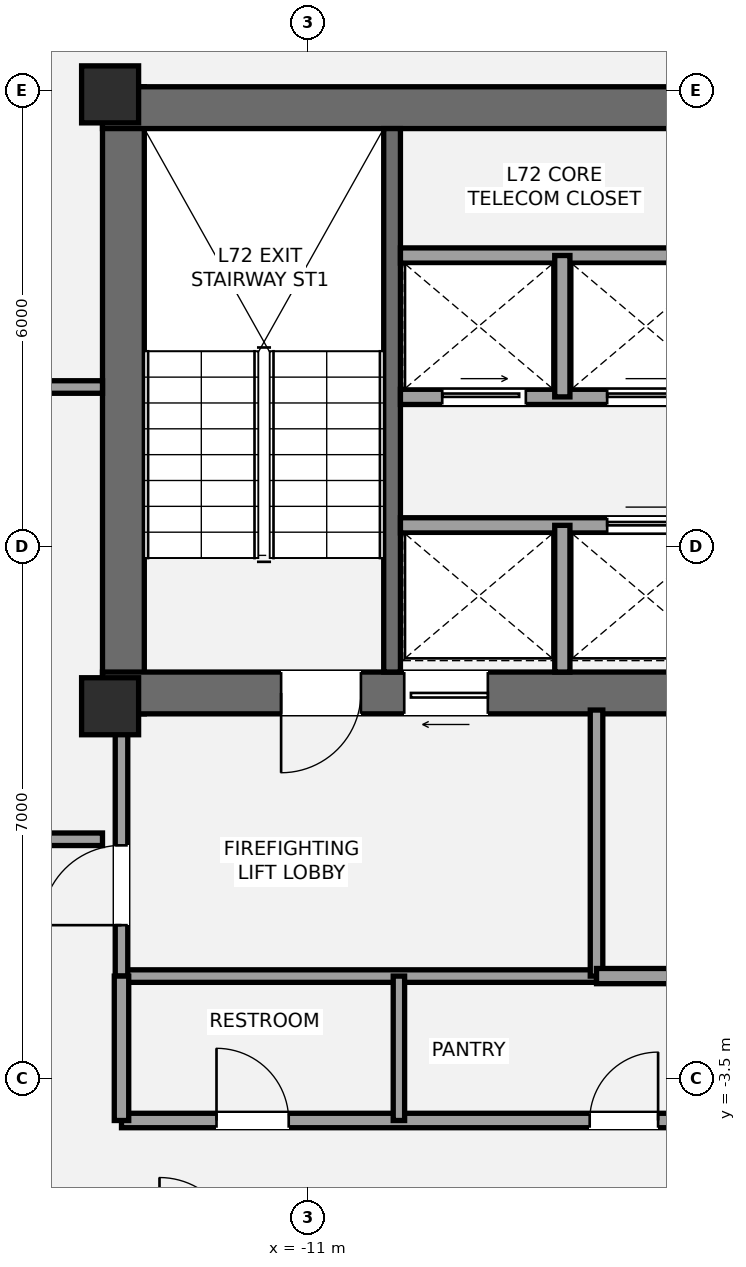
"""IFC4 building model, lengths in metres.
Left out: names, types, materials, properties, quantities, classifications, styles, units other than length and angle.
Written with IfcOpenShell. Run it as: python <this file> out.ifc"""

import sys

from ifc_helpers import new_model, si_unit, direction, frame, frame_2d, origin, origin_2d, place, context, subcontext, project, spatial, rectangle, extrude, element, fill, save


model = new_model("IFC4")
c1 = context("Model", 3, precision=1e-05, world=origin(), true_north=direction((0.0, 1.0)))
c2 = subcontext(c1, "Body", "Model", "MODEL_VIEW")
j1 = project(units=[si_unit("LENGTHUNIT", "METRE"), si_unit("PLANEANGLEUNIT", "RADIAN")], contexts=[c1])
p1 = place(None, origin())
s1 = spatial("IfcSite", under=j1, at=p1, CompositionType="ELEMENT")
p2 = place(p1, origin())
s2 = spatial("IfcBuilding", under=s1, at=p2, CompositionType="ELEMENT")
p3 = place(p2, frame((0.0, 0.0, 254.1)))
s3 = spatial("IfcBuildingStorey", under=s2, at=p3, CompositionType="ELEMENT", Elevation=254.1)
p4 = place(p3, frame((-13.425, 1.3, 0.0), z_axis=(0.0, 0.0, 1.0), x_axis=(0.0, 1.0, 0.0)))
e1 = element("IfcWall", 1, at=p4, inside=s3, PredefinedType="SHEAR", context=c2, shape_type="SweptSolid", body=[
    extrude(rectangle(XDim=8.25, YDim=0.55, at=frame_2d((4.125, 0.0))), origin(), (0.0, 0.0, 1.0), 3.15),
])
p5 = place(p3, frame((-13.7, 9.275, 0.0), z_axis=(0.0, 0.0, 1.0), x_axis=(1.0, 0.0, 0.0)))
e2 = element("IfcWall", 2, at=p5, inside=s3, PredefinedType="SHEAR", context=c2, shape_type="SweptSolid", body=[
    extrude(rectangle(XDim=9.175, YDim=0.55, at=frame_2d((4.587, 0.0))), origin(), (0.0, 0.0, 1.0), 3.15),
])
p6 = place(p3, frame((-4.925, 1.575, 0.0), z_axis=(0.0, 0.0, 1.0), x_axis=(-1.0, 0.0, 0.0)))
e3 = element("IfcWall", 3, at=p6, inside=s3, PredefinedType="SHEAR", context=c2, shape_type="SweptSolid", body=[
    extrude(rectangle(XDim=8.775, YDim=0.55, at=frame_2d((4.387, 0.0))), origin(), (0.0, 0.0, 1.0), 3.15),
])
p7 = place(p6, frame((5.375, 0.0, 0.0)))
e4 = element("IfcOpeningElement", 4, at=p7, cuts=e3, PredefinedType="OPENING", context=c2, shape_type="SweptSolid", body=[
    extrude(rectangle(XDim=1.05, YDim=2.15, at=frame_2d((0.525, 1.075))), frame((0.0, 0.285, 0.0), z_axis=(0.0, -1.0, 0.0), x_axis=(1.0, 0.0, 0.0)), (0.0, 0.0, 1.0), 0.57),
])
p8 = place(p6, frame((3.705, 0.0, 0.0)))
e5 = element("IfcOpeningElement", 5, at=p8, cuts=e3, PredefinedType="OPENING", context=c2, shape_type="SweptSolid", body=[
    extrude(rectangle(XDim=1.1, YDim=2.2, at=frame_2d((0.55, 1.1))), frame((0.0, 0.285, 0.0), z_axis=(0.0, -1.0, 0.0), x_axis=(1.0, 0.0, 0.0)), (0.0, 0.0, 1.0), 0.57),
])
p9 = place(p3, frame((-9.89, 1.85, 0.0), z_axis=(0.0, 0.0, 1.0), x_axis=(0.0, 1.0, 0.0)))
e6 = element("IfcWall", 6, at=p9, inside=s3, PredefinedType="SHEAR", context=c2, shape_type="SweptSolid", body=[
    extrude(rectangle(XDim=7.15, YDim=0.22, at=frame_2d((3.575, 0.0))), origin(), (0.0, 0.0, 1.0), 3.15),
])
for number, where, z_axis, x_axis in (
    (7, (-13.6, 1.4, 0.0), (0.0, 0.0, 1.0), (1.0, 0.0, 0.0)),
    (8, (-13.6, 9.45, 0.0), (0.0, 0.0, 1.0), (1.0, 0.0, 0.0)),
):
    element("IfcColumn", number, at=place(p3, frame(where, z_axis=z_axis, x_axis=x_axis)), inside=s3, PredefinedType="PILASTER", context=c2, shape_type="SweptSolid", body=[
        extrude(rectangle(XDim=0.75, YDim=0.75, at=origin_2d()), origin(), (0.0, 0.0, 1.0), 3.15),
    ])
p10 = place(p3, frame((-17.414, 9.576, 0.0), z_axis=(0.0, 0.0, 1.0), x_axis=(0.827695346596, 0.561177702001, 0.0)))
e9 = element("IfcWall", 9, at=p10, inside=s3, PredefinedType="STANDARD", context=c2, shape_type="SweptSolid", body=[
    extrude(rectangle(XDim=3.8, YDim=0.44, at=frame_2d((1.9, 0.0))), origin(), (0.0, 0.0, 1.0), 2.336),
])
p11 = place(p10, frame((1.45, 0.0, 0.55)))
e10 = element("IfcOpeningElement", 10, at=p11, cuts=e9, PredefinedType="OPENING", context=c2, shape_type="SweptSolid", body=[
    extrude(rectangle(XDim=1.75, YDim=1.55, at=frame_2d((0.875, 0.775))), frame((0.0, 0.23, 0.0), z_axis=(0.0, -1.0, 0.0), x_axis=(1.0, 0.0, 0.0)), (0.0, 0.0, 1.0), 0.46),
])
p12 = place(p3, frame((-13.45, -2.15, 0.0), z_axis=(0.0, 0.0, 1.0), x_axis=(1.0, 0.0, 0.0)))
e11 = element("IfcWall", 11, at=p12, inside=s3, PredefinedType="PARTITIONING", context=c2, shape_type="SweptSolid", body=[
    extrude(rectangle(XDim=6.25, YDim=0.165, at=frame_2d((3.125, 0.0))), origin(), (0.0, 0.0, 1.0), 2.423),
])
p13 = place(p3, frame((-13.45, -2.15, 0.0), z_axis=(0.0, 0.0, 1.0), x_axis=(0.0, 1.0, 0.0)))
e12 = element("IfcWall", 12, at=p13, inside=s3, PredefinedType="PARTITIONING", context=c2, shape_type="SweptSolid", body=[
    extrude(rectangle(XDim=3.5, YDim=0.165, at=frame_2d((1.75, 0.0))), origin(), (0.0, 0.0, 1.0), 2.423),
])
p14 = place(p13, frame((0.67, 0.0, 0.0)))
e13 = element("IfcOpeningElement", 13, at=p14, cuts=e12, PredefinedType="OPENING", context=c2, shape_type="SweptSolid", body=[
    extrude(rectangle(XDim=1.05, YDim=2.15, at=frame_2d((0.525, 1.075))), frame((0.0, 0.093, 0.0), z_axis=(0.0, -1.0, 0.0), x_axis=(1.0, 0.0, 0.0)), (0.0, 0.0, 1.0), 0.185),
])
p15 = place(p3, frame((-7.2, -2.15, 0.0), z_axis=(0.0, 0.0, 1.0), x_axis=(0.0, 1.0, 0.0)))
e14 = element("IfcWall", 14, at=p15, inside=s3, PredefinedType="PARTITIONING", context=c2, shape_type="SweptSolid", body=[
    extrude(rectangle(XDim=3.5, YDim=0.165, at=frame_2d((1.75, 0.0))), origin(), (0.0, 0.0, 1.0), 2.423),
])
p16 = place(p3, frame((-7.2, -2.15, 0.0), z_axis=(0.0, 0.0, 1.0), x_axis=(1.0, 0.0, 0.0)))
e15 = element("IfcWall", 15, at=p16, inside=s3, PredefinedType="SOLIDWALL", context=c2, shape_type="SweptSolid", body=[
    extrude(rectangle(XDim=2.25, YDim=0.2, at=frame_2d((1.125, 0.0))), origin(), (0.0, 0.0, 1.0), 2.97),
])
p17 = place(p3, frame((-9.78, 3.78, 0.0), z_axis=(0.0, 0.0, 1.0), x_axis=(1.0, 0.0, 0.0)))
e16 = element("IfcWall", 16, at=p17, inside=s3, PredefinedType="SOLIDWALL", context=c2, shape_type="SweptSolid", body=[
    extrude(rectangle(XDim=4.305, YDim=0.2, at=frame_2d((2.152, 0.0))), origin(), (0.0, 0.0, 1.0), 2.97),
])
p18 = place(p17, frame((2.72, 0.0, 0.0)))
e17 = element("IfcOpeningElement", 17, at=p18, cuts=e16, PredefinedType="OPENING", context=c2, shape_type="SweptSolid", body=[
    extrude(rectangle(XDim=1.1, YDim=2.2, at=frame_2d((0.55, 1.1))), frame((0.0, 0.11, 0.0), z_axis=(0.0, -1.0, 0.0), x_axis=(1.0, 0.0, 0.0)), (0.0, 0.0, 1.0), 0.22),
])
p19 = place(p3, frame((-7.65, 1.85, 0.0), z_axis=(0.0, 0.0, 1.0), x_axis=(0.0, 1.0, 0.0)))
e18 = element("IfcWall", 18, at=p19, inside=s3, PredefinedType="SOLIDWALL", context=c2, shape_type="SweptSolid", body=[
    extrude(rectangle(XDim=1.93, YDim=0.2, at=frame_2d((0.965, 0.0))), origin(), (0.0, 0.0, 1.0), 2.97),
])
p20 = place(p3, frame((-9.78, 5.47, 0.0), z_axis=(0.0, 0.0, 1.0), x_axis=(1.0, 0.0, 0.0)))
e19 = element("IfcWall", 19, at=p20, inside=s3, PredefinedType="SOLIDWALL", context=c2, shape_type="SweptSolid", body=[
    extrude(rectangle(XDim=4.305, YDim=0.2, at=frame_2d((2.152, 0.0))), origin(), (0.0, 0.0, 1.0), 2.97),
])
p21 = place(p20, frame((0.55, 0.0, 0.0)))
e20 = element("IfcOpeningElement", 20, at=p21, cuts=e19, PredefinedType="OPENING", context=c2, shape_type="SweptSolid", body=[
    extrude(rectangle(XDim=1.1, YDim=2.2, at=frame_2d((0.55, 1.1))), frame((0.0, 0.11, 0.0), z_axis=(0.0, -1.0, 0.0), x_axis=(1.0, 0.0, 0.0)), (0.0, 0.0, 1.0), 0.22),
])
p22 = place(p20, frame((2.72, 0.0, 0.0)))
e21 = element("IfcOpeningElement", 21, at=p22, cuts=e19, PredefinedType="OPENING", context=c2, shape_type="SweptSolid", body=[
    extrude(rectangle(XDim=1.1, YDim=2.2, at=frame_2d((0.55, 1.1))), frame((0.0, 0.11, 0.0), z_axis=(0.0, -1.0, 0.0), x_axis=(1.0, 0.0, 0.0)), (0.0, 0.0, 1.0), 0.22),
])
p23 = place(p3, frame((-9.78, 7.33, 0.0), z_axis=(0.0, 0.0, 1.0), x_axis=(1.0, 0.0, 0.0)))
e22 = element("IfcWall", 22, at=p23, inside=s3, PredefinedType="SOLIDWALL", context=c2, shape_type="SweptSolid", body=[
    extrude(rectangle(XDim=4.305, YDim=0.2, at=frame_2d((2.152, 0.0))), origin(), (0.0, 0.0, 1.0), 2.97),
])
p24 = place(p3, frame((-7.65, 5.47, 0.0), z_axis=(0.0, 0.0, 1.0), x_axis=(0.0, 1.0, 0.0)))
e23 = element("IfcWall", 23, at=p24, inside=s3, PredefinedType="SOLIDWALL", context=c2, shape_type="SweptSolid", body=[
    extrude(rectangle(XDim=1.86, YDim=0.2, at=frame_2d((0.93, 0.0))), origin(), (0.0, 0.0, 1.0), 2.97),
])
p25 = place(p3, frame((-13.45, -4.05, 0.0), z_axis=(0.0, 0.0, 1.0), x_axis=(1.0, 0.0, 0.0)))
e24 = element("IfcWall", 24, at=p25, inside=s3, PredefinedType="PLUMBINGWALL", context=c2, shape_type="SweptSolid", body=[
    extrude(rectangle(XDim=11.35, YDim=0.19, at=frame_2d((5.675, 0.0))), origin(), (0.0, 0.0, 1.0), 2.357),
])
p26 = place(p25, frame((1.25, 0.0, 0.0)))
e25 = element("IfcOpeningElement", 25, at=p26, cuts=e24, PredefinedType="OPENING", context=c2, shape_type="SweptSolid", body=[
    extrude(rectangle(XDim=0.95, YDim=2.15, at=frame_2d((0.475, 1.075))), frame((0.0, 0.105, 0.0), z_axis=(0.0, -1.0, 0.0), x_axis=(1.0, 0.0, 0.0)), (0.0, 0.0, 1.0), 0.21),
])
p27 = place(p25, frame((6.16, 0.0, 0.0)))
e26 = element("IfcOpeningElement", 26, at=p27, cuts=e24, PredefinedType="OPENING", context=c2, shape_type="SweptSolid", body=[
    extrude(rectangle(XDim=0.9, YDim=2.1, at=frame_2d((0.45, 1.05))), frame((0.0, 0.105, 0.0), z_axis=(0.0, -1.0, 0.0), x_axis=(1.0, 0.0, 0.0)), (0.0, 0.0, 1.0), 0.21),
])
p28 = place(p3, frame((-13.45, -4.05, 0.0), z_axis=(0.0, 0.0, 1.0), x_axis=(0.0, 1.0, 0.0)))
e27 = element("IfcWall", 27, at=p28, inside=s3, PredefinedType="PLUMBINGWALL", context=c2, shape_type="SweptSolid", body=[
    extrude(rectangle(XDim=1.9, YDim=0.19, at=frame_2d((0.95, 0.0))), origin(), (0.0, 0.0, 1.0), 2.423),
])
p29 = place(p3, frame((-9.8, -4.05, 0.0), z_axis=(0.0, 0.0, 1.0), x_axis=(0.0, 1.0, 0.0)))
e28 = element("IfcWall", 28, at=p29, inside=s3, PredefinedType="PLUMBINGWALL", context=c2, shape_type="SweptSolid", body=[
    extrude(rectangle(XDim=1.9, YDim=0.15, at=frame_2d((0.95, 0.0))), origin(), (0.0, 0.0, 1.0), 2.97),
])
p30 = place(p3, frame((-16.1, -0.35, 0.0), z_axis=(0.0, 0.0, 1.0), x_axis=(1.0, 0.0, 0.0)))
e29 = element("IfcWall", 29, at=p30, inside=s3, PredefinedType="PARTITIONING", context=c2, shape_type="SweptSolid", body=[
    extrude(rectangle(XDim=2.4, YDim=0.165, at=frame_2d((1.2, 0.0))), origin(), (0.0, 0.0, 1.0), 2.423),
])
p31 = place(p3, frame((-19.653, 5.6, 0.0), z_axis=(0.0, 0.0, 1.0), x_axis=(1.0, 0.0, 0.0)))
e30 = element("IfcWall", 30, at=p31, inside=s3, PredefinedType="PARTITIONING", context=c2, shape_type="SweptSolid", body=[
    extrude(rectangle(XDim=5.953, YDim=0.165, at=frame_2d((2.977, 0.0))), origin(), (0.0, 0.0, 1.0), 2.97),
])
p32 = place(p31, frame((2.073, 0.0, 0.0)))
e31 = element("IfcOpeningElement", 31, at=p32, cuts=e30, PredefinedType="OPENING", context=c2, shape_type="SweptSolid", body=[
    extrude(rectangle(XDim=0.9, YDim=2.1, at=frame_2d((0.45, 1.05))), frame((0.0, 0.093, 0.0), z_axis=(0.0, -1.0, 0.0), x_axis=(1.0, 0.0, 0.0)), (0.0, 0.0, 1.0), 0.185),
])
p33 = place(p7, origin())
e32 = element("IfcDoor", 32, at=p33, inside=s3, OperationType="SINGLE_SWING_RIGHT", PredefinedType="DOOR", context=c2, shape_type="SweptSolid", body=[
    extrude(rectangle(XDim=1.05, YDim=2.15, at=frame_2d((0.525, 1.075))), frame((0.0, 0.025, 0.0), z_axis=(0.0, -1.0, 0.0), x_axis=(1.0, 0.0, 0.0)), (0.0, 0.0, 1.0), 0.05),
])
fill(e4, e32)
p34 = place(p14, origin())
e33 = element("IfcDoor", 33, at=p34, inside=s3, OperationType="SINGLE_SWING_LEFT", PredefinedType="DOOR", context=c2, shape_type="SweptSolid", body=[
    extrude(rectangle(XDim=1.05, YDim=2.15, at=frame_2d((0.525, 1.075))), frame((0.0, 0.025, 0.0), z_axis=(0.0, -1.0, 0.0), x_axis=(1.0, 0.0, 0.0)), (0.0, 0.0, 1.0), 0.05),
])
fill(e13, e33)
p35 = place(p8, origin())
e34 = element("IfcDoor", 34, at=p35, inside=s3, OperationType="SLIDING_TO_LEFT", PredefinedType="DOOR", context=c2, shape_type="SweptSolid", body=[
    extrude(rectangle(XDim=1.1, YDim=2.2, at=frame_2d((0.55, 1.1))), frame((0.0, 0.025, 0.0), z_axis=(0.0, -1.0, 0.0), x_axis=(1.0, 0.0, 0.0)), (0.0, 0.0, 1.0), 0.05),
])
fill(e5, e34)
p36 = place(p21, origin())
e35 = element("IfcDoor", 35, at=p36, inside=s3, OperationType="SLIDING_TO_LEFT", PredefinedType="DOOR", context=c2, shape_type="SweptSolid", body=[
    extrude(rectangle(XDim=1.1, YDim=2.2, at=frame_2d((0.55, 1.1))), frame((0.0, 0.025, 0.0), z_axis=(0.0, -1.0, 0.0), x_axis=(1.0, 0.0, 0.0)), (0.0, 0.0, 1.0), 0.05),
])
fill(e20, e35)
p37 = place(p22, origin())
e36 = element("IfcDoor", 36, at=p37, inside=s3, OperationType="SLIDING_TO_LEFT", PredefinedType="DOOR", context=c2, shape_type="SweptSolid", body=[
    extrude(rectangle(XDim=1.1, YDim=2.2, at=frame_2d((0.55, 1.1))), frame((0.0, 0.025, 0.0), z_axis=(0.0, -1.0, 0.0), x_axis=(1.0, 0.0, 0.0)), (0.0, 0.0, 1.0), 0.05),
])
fill(e21, e36)
p38 = place(p18, origin())
e37 = element("IfcDoor", 37, at=p38, inside=s3, OperationType="SLIDING_TO_LEFT", PredefinedType="DOOR", context=c2, shape_type="SweptSolid", body=[
    extrude(rectangle(XDim=1.1, YDim=2.2, at=frame_2d((0.55, 1.1))), frame((0.0, 0.025, 0.0), z_axis=(0.0, -1.0, 0.0), x_axis=(1.0, 0.0, 0.0)), (0.0, 0.0, 1.0), 0.05),
])
fill(e17, e37)
p39 = place(p26, origin())
e38 = element("IfcDoor", 38, at=p39, inside=s3, OperationType="SINGLE_SWING_LEFT", PredefinedType="DOOR", context=c2, shape_type="SweptSolid", body=[
    extrude(rectangle(XDim=0.95, YDim=2.15, at=frame_2d((0.475, 1.075))), frame((0.0, 0.025, 0.0), z_axis=(0.0, -1.0, 0.0), x_axis=(1.0, 0.0, 0.0)), (0.0, 0.0, 1.0), 0.05),
])
fill(e25, e38)
p40 = place(p27, origin())
e39 = element("IfcDoor", 39, at=p40, inside=s3, OperationType="SINGLE_SWING_RIGHT", PredefinedType="DOOR", context=c2, shape_type="SweptSolid", body=[
    extrude(rectangle(XDim=0.9, YDim=2.1, at=frame_2d((0.45, 1.05))), frame((0.0, 0.025, 0.0), z_axis=(0.0, -1.0, 0.0), x_axis=(1.0, 0.0, 0.0)), (0.0, 0.0, 1.0), 0.05),
])
fill(e26, e39)
save(model, sys.argv[1])
